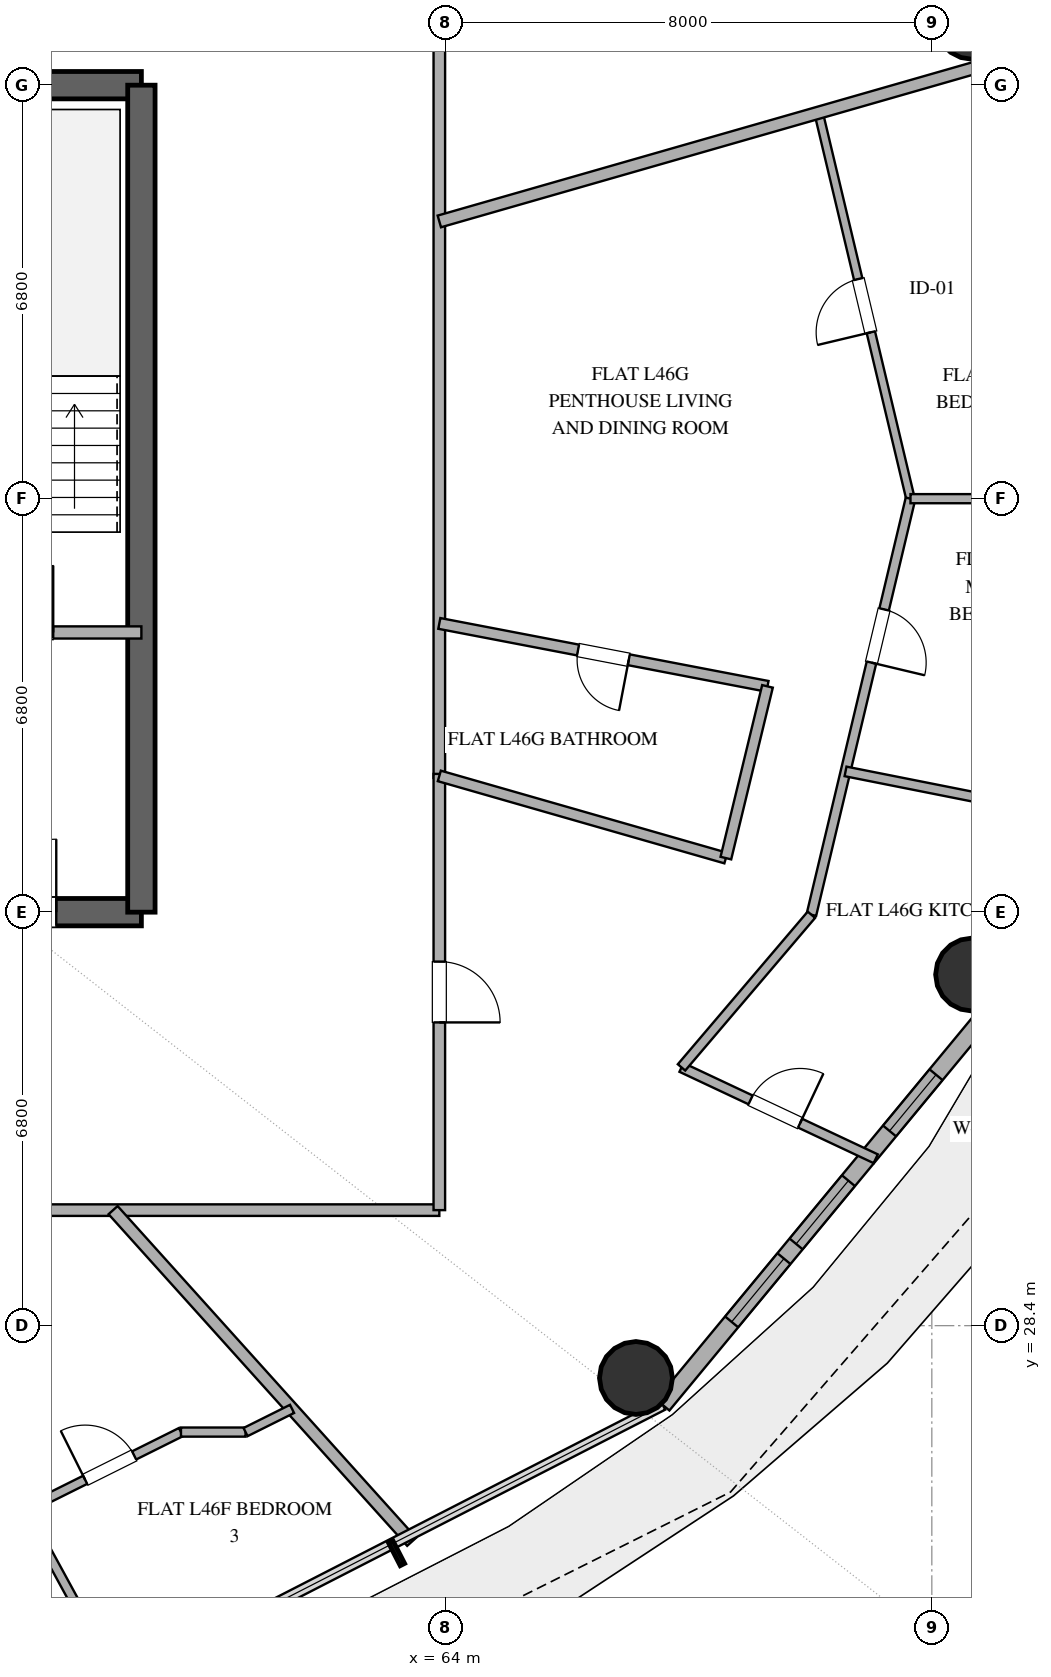
"""IFC4 building model, lengths in metres.
Left out: names, types, materials, properties, quantities, classifications, styles, units other than length and angle.
Written with IfcOpenShell. Run it as: python <this file> out.ifc"""

import sys

from ifc_helpers import new_model, si_unit, direction, frame, frame_2d, origin, origin_2d, place, context, subcontext, project, spatial, rectangle, hollow_circle, extrude, element, fill, save


model = new_model("IFC4")
c1 = context("Model", 3, precision=1e-05, world=origin(), true_north=direction((0.0, 1.0)))
c2 = subcontext(c1, "Body", "Model", "MODEL_VIEW")
j1 = project(units=[si_unit("LENGTHUNIT", "METRE"), si_unit("PLANEANGLEUNIT", "RADIAN")], contexts=[c1])
p1 = place(None, origin())
s1 = spatial("IfcSite", under=j1, at=p1, CompositionType="ELEMENT")
p2 = place(p1, origin())
s2 = spatial("IfcBuilding", under=s1, at=p2, CompositionType="ELEMENT")
p3 = place(p2, frame((0.0, 0.0, 183.0)))
s3 = spatial("IfcBuildingStorey", under=s2, at=p3, CompositionType="ELEMENT", Elevation=183.0)
p4 = place(p3, frame((55.0, 35.2, 0.0), z_axis=(0.0, 0.0, 1.0), x_axis=(1.0, 0.0, 0.0)))
e1 = element("IfcWall", 1, at=p4, inside=s3, PredefinedType="SHEAR", context=c2, shape_type="SweptSolid", body=[
    extrude(rectangle(XDim=4.0, YDim=0.45, at=frame_2d((2.0, 0.0))), origin(), (0.0, 0.0, 1.0), 3.38),
])
p5 = place(p4, frame((1.4, 0.0, 0.0)))
e2 = element("IfcOpeningElement", 2, at=p5, cuts=e1, PredefinedType="OPENING", context=c2, shape_type="SweptSolid", body=[
    extrude(rectangle(XDim=1.2, YDim=2.15, at=frame_2d((0.6, 1.075))), frame((0.0, 0.235, 0.0), z_axis=(0.0, -1.0, 0.0), x_axis=(1.0, 0.0, 0.0)), (0.0, 0.0, 1.0), 0.47),
])
p6 = place(p3, frame((55.0, 48.8, 0.0), z_axis=(0.0, 0.0, 1.0), x_axis=(1.0, 0.0, 0.0)))
e3 = element("IfcWall", 3, at=p6, inside=s3, PredefinedType="SHEAR", context=c2, shape_type="SweptSolid", body=[
    extrude(rectangle(XDim=4.0, YDim=0.45, at=frame_2d((2.0, 0.0))), origin(), (0.0, 0.0, 1.0), 3.38),
])
p7 = place(p3, frame((59.0, 35.2, 0.0), z_axis=(0.0, 0.0, 1.0), x_axis=(0.0, 1.0, 0.0)))
e4 = element("IfcWall", 4, at=p7, inside=s3, PredefinedType="SHEAR", context=c2, shape_type="SweptSolid", body=[
    extrude(rectangle(XDim=13.6, YDim=0.45, at=frame_2d((6.8, 0.0))), origin(), (0.0, 0.0, 1.0), 3.38),
])
for number, where, z_axis, x_axis in (
    (5, (72.662, 49.826, 0.0), (0.0, 0.0, 1.0), (1.0, 0.0, 0.0)),
    (6, (67.134, 27.54, 0.0), (0.0, 0.0, 1.0), (1.0, 0.0, 0.0)),
    (7, (72.662, 34.174, 0.0), (0.0, 0.0, 1.0), (1.0, 0.0, 0.0)),
):
    element("IfcColumn", number, at=place(p3, frame(where, z_axis=z_axis, x_axis=x_axis)), inside=s3, PredefinedType="COLUMN", context=c2, shape_type="SweptSolid", body=[
        extrude(hollow_circle(Radius=0.6, WallThickness=0.032, at=origin_2d()), origin(), (0.0, 0.0, 1.0), 3.38),
    ])
p8 = place(p3, frame((67.576, 27.094, 0.0), z_axis=(0.0, 0.0, 1.0), x_axis=(0.637333477683, 0.770588111915, 0.0)))
e8 = element("IfcWall", 8, at=p8, inside=s3, PredefinedType="SOLIDWALL", context=c2, shape_type="SweptSolid", body=[
    extrude(rectangle(XDim=8.875, YDim=0.28, at=frame_2d((4.438, 0.0))), origin(), (0.0, 0.0, 1.0), 3.38),
])
p9 = place(p8, frame((1.775, 0.0, 0.85)))
e9 = element("IfcOpeningElement", 9, at=p9, cuts=e8, PredefinedType="OPENING", context=c2, shape_type="SweptSolid", body=[
    extrude(rectangle(XDim=1.35, YDim=1.8, at=frame_2d((0.675, 0.9))), frame((0.0, 0.15, 0.0), z_axis=(0.0, -1.0, 0.0), x_axis=(1.0, 0.0, 0.0)), (0.0, 0.0, 1.0), 0.3),
])
p10 = place(p8, frame((3.439, 0.0, 0.85)))
e10 = element("IfcOpeningElement", 10, at=p10, cuts=e8, PredefinedType="OPENING", context=c2, shape_type="SweptSolid", body=[
    extrude(rectangle(XDim=1.35, YDim=1.8, at=frame_2d((0.675, 0.9))), frame((0.0, 0.15, 0.0), z_axis=(0.0, -1.0, 0.0), x_axis=(1.0, 0.0, 0.0)), (0.0, 0.0, 1.0), 0.3),
])
p11 = place(p8, frame((5.85, 0.0, 0.85)))
e11 = element("IfcOpeningElement", 11, at=p11, cuts=e8, PredefinedType="OPENING", context=c2, shape_type="SweptSolid", body=[
    extrude(rectangle(XDim=1.2, YDim=1.8, at=frame_2d((0.6, 0.9))), frame((0.0, 0.15, 0.0), z_axis=(0.0, -1.0, 0.0), x_axis=(1.0, 0.0, 0.0)), (0.0, 0.0, 1.0), 0.3),
])
p12 = place(p3, frame((55.0, 39.8, 0.0), z_axis=(0.0, 0.0, 1.0), x_axis=(1.0, 0.0, 0.0)))
e12 = element("IfcWall", 12, at=p12, inside=s3, PredefinedType="SOLIDWALL", context=c2, shape_type="SweptSolid", body=[
    extrude(rectangle(XDim=4.0, YDim=0.2, at=frame_2d((2.0, 0.0))), origin(), (0.0, 0.0, 1.0), 2.74),
])
p13 = place(p12, frame((1.45, 0.0, 0.0)))
e13 = element("IfcOpeningElement", 13, at=p13, cuts=e12, PredefinedType="OPENING", context=c2, shape_type="SweptSolid", body=[
    extrude(rectangle(XDim=1.1, YDim=2.15, at=frame_2d((0.55, 1.075))), frame((0.0, 0.11, 0.0), z_axis=(0.0, -1.0, 0.0), x_axis=(1.0, 0.0, 0.0)), (0.0, 0.0, 1.0), 0.22),
])
p14 = place(p3, frame((46.818, 30.3, 0.0), z_axis=(0.0, 0.0, 1.0), x_axis=(1.0, 0.0, 0.0)))
e14 = element("IfcWall", 14, at=p14, inside=s3, PredefinedType="PARTITIONING", context=c2, shape_type="SweptSolid", body=[
    extrude(rectangle(XDim=17.082, YDim=0.19, at=frame_2d((8.541, 0.0))), origin(), (0.0, 0.0, 1.0), 2.74),
])
p15 = place(p14, frame((5.358, 0.0, 0.0)))
e15 = element("IfcOpeningElement", 15, at=p15, cuts=e14, PredefinedType="OPENING", context=c2, shape_type="SweptSolid", body=[
    extrude(rectangle(XDim=1.0, YDim=2.2, at=frame_2d((0.5, 1.1))), frame((0.0, 0.105, 0.0), z_axis=(0.0, -1.0, 0.0), x_axis=(1.0, 0.0, 0.0)), (0.0, 0.0, 1.0), 0.21),
])
p16 = place(p3, frame((63.9, 53.7, 0.0), z_axis=(0.0, 0.0, 1.0), x_axis=(0.0, -1.0, 0.0)))
e16 = element("IfcWall", 16, at=p16, inside=s3, PredefinedType="PARTITIONING", context=c2, shape_type="SweptSolid", body=[
    extrude(rectangle(XDim=16.292, YDim=0.19, at=frame_2d((8.146, 0.0))), origin(), (0.0, 0.0, 1.0), 2.74),
])
p17 = place(p16, frame((3.087, 0.0, 0.0)))
e17 = element("IfcOpeningElement", 17, at=p17, cuts=e16, PredefinedType="OPENING", context=c2, shape_type="SweptSolid", body=[
    extrude(rectangle(XDim=1.0, YDim=2.2, at=frame_2d((0.5, 1.1))), frame((0.0, 0.105, 0.0), z_axis=(0.0, -1.0, 0.0), x_axis=(1.0, 0.0, 0.0)), (0.0, 0.0, 1.0), 0.21),
])
p18 = place(p3, frame((63.9, 37.474, 0.0), z_axis=(0.0, 0.0, 1.0), x_axis=(0.0, -1.0, 0.0)))
e18 = element("IfcWall", 18, at=p18, inside=s3, PredefinedType="PARTITIONING", context=c2, shape_type="SweptSolid", body=[
    extrude(rectangle(XDim=7.174, YDim=0.19, at=frame_2d((3.587, 0.0))), origin(), (0.0, 0.0, 1.0), 2.74),
])
p19 = place(p18, frame((3.087, 0.0, 0.0)))
e19 = element("IfcOpeningElement", 19, at=p19, cuts=e18, PredefinedType="OPENING", context=c2, shape_type="SweptSolid", body=[
    extrude(rectangle(XDim=1.0, YDim=2.2, at=frame_2d((0.5, 1.1))), frame((0.0, 0.105, 0.0), z_axis=(0.0, -1.0, 0.0), x_axis=(1.0, 0.0, 0.0)), (0.0, 0.0, 1.0), 0.21),
])
p20 = place(p3, frame((71.649, 42.0, 0.0), z_axis=(0.0, 0.0, 1.0), x_axis=(-0.231639074409, 0.972801798522, 0.0)))
e20 = element("IfcWall", 20, at=p20, inside=s3, PredefinedType="PARTITIONING", context=c2, shape_type="SweptSolid", body=[
    extrude(rectangle(XDim=6.525, YDim=0.14, at=frame_2d((3.263, 0.0))), origin(), (0.0, 0.0, 1.0), 2.74),
])
p21 = place(p20, frame((2.812, 0.0, 0.0)))
e21 = element("IfcOpeningElement", 21, at=p21, cuts=e20, PredefinedType="OPENING", context=c2, shape_type="SweptSolid", body=[
    extrude(rectangle(XDim=0.9, YDim=2.1, at=frame_2d((0.45, 1.05))), frame((0.0, 0.08, 0.0), z_axis=(0.0, -1.0, 0.0), x_axis=(1.0, 0.0, 0.0)), (0.0, 0.0, 1.0), 0.16),
])
p22 = place(p3, frame((73.528, 49.32, 0.0), z_axis=(0.0, 0.0, 1.0), x_axis=(-0.961265987417, -0.275622389211, 0.0)))
e22 = element("IfcWall", 22, at=p22, inside=s3, PredefinedType="PARTITIONING", context=c2, shape_type="SweptSolid", body=[
    extrude(rectangle(XDim=10.016, YDim=0.2, at=frame_2d((5.008, 0.0))), origin(), (0.0, 0.0, 1.0), 2.74),
])
p23 = place(p3, frame((69.297, 38.914, 0.0), z_axis=(0.0, 0.0, 1.0), x_axis=(-0.982108019882, 0.188318446478, 0.0)))
e23 = element("IfcWall", 23, at=p23, inside=s3, PredefinedType="PLUMBINGWALL", context=c2, shape_type="SweptSolid", body=[
    extrude(rectangle(XDim=5.496, YDim=0.18, at=frame_2d((2.748, 0.0))), origin(), (0.0, 0.0, 1.0), 2.74),
])
p24 = place(p23, frame((2.323, 0.0, 0.0)))
e24 = element("IfcOpeningElement", 24, at=p24, cuts=e23, PredefinedType="OPENING", context=c2, shape_type="SweptSolid", body=[
    extrude(rectangle(XDim=0.85, YDim=2.1, at=frame_2d((0.425, 1.05))), frame((0.0, 0.1, 0.0), z_axis=(0.0, -1.0, 0.0), x_axis=(1.0, 0.0, 0.0)), (0.0, 0.0, 1.0), 0.2),
])
p25 = place(p3, frame((63.9, 37.441, 0.0), z_axis=(0.0, 0.0, 1.0), x_axis=(0.961266088446, -0.27562203686, 0.0)))
e25 = element("IfcWall", 25, at=p25, inside=s3, PredefinedType="PLUMBINGWALL", context=c2, shape_type="SweptSolid", body=[
    extrude(rectangle(XDim=4.903, YDim=0.18, at=frame_2d((2.451, 0.0))), origin(), (0.0, 0.0, 1.0), 2.74),
])
p26 = place(p3, frame((71.649, 42.0, 0.0), z_axis=(0.0, 0.0, 1.0), x_axis=(-0.231625219966, -0.972805097373, 0.0)))
e26 = element("IfcWall", 26, at=p26, inside=s3, PredefinedType="PLUMBINGWALL", context=c2, shape_type="SweptSolid", body=[
    extrude(rectangle(XDim=7.033, YDim=0.16, at=frame_2d((3.517, 0.0))), origin(), (0.0, 0.0, 1.0), 2.74),
])
p27 = place(p26, frame((1.871, 0.0, 0.0)))
e27 = element("IfcOpeningElement", 27, at=p27, cuts=e26, PredefinedType="OPENING", context=c2, shape_type="SweptSolid", body=[
    extrude(rectangle(XDim=0.9, YDim=2.1, at=frame_2d((0.45, 1.05))), frame((0.0, 0.09, 0.0), z_axis=(0.0, -1.0, 0.0), x_axis=(1.0, 0.0, 0.0)), (0.0, 0.0, 1.0), 0.18),
])
p28 = place(p3, frame((63.445, 24.846, 0.0), z_axis=(0.0, 0.0, 1.0), x_axis=(-0.669111750453, 0.743161802979, 0.0)))
e28 = element("IfcWall", 28, at=p28, inside=s3, PredefinedType="PARTITIONING", context=c2, shape_type="SweptSolid", body=[
    extrude(rectangle(XDim=7.339, YDim=0.2, at=frame_2d((3.669, 0.0))), origin(), (0.0, 0.0, 1.0), 2.74),
])
p29 = place(p3, frame((75.219, 42.0, 0.0), z_axis=(0.0, 0.0, 1.0), x_axis=(-1.0, 0.0, 0.0)))
e29 = element("IfcWall", 29, at=p29, inside=s3, PredefinedType="PARTITIONING", context=c2, shape_type="SweptSolid", body=[
    extrude(rectangle(XDim=3.571, YDim=0.15, at=frame_2d((1.785, 0.0))), origin(), (0.0, 0.0, 1.0), 2.74),
])
p30 = place(p3, frame((67.883, 32.647, 0.0), z_axis=(0.0, 0.0, 1.0), x_axis=(0.904904903403, -0.425613810628, 0.0)))
e30 = element("IfcWall", 30, at=p30, inside=s3, PredefinedType="PLUMBINGWALL", context=c2, shape_type="SweptSolid", body=[
    extrude(rectangle(XDim=3.53, YDim=0.16, at=frame_2d((1.765, 0.0))), origin(), (0.0, 0.0, 1.0), 2.74),
])
p31 = place(p30, frame((1.255, 0.0, 0.0)))
e31 = element("IfcOpeningElement", 31, at=p31, cuts=e30, PredefinedType="OPENING", context=c2, shape_type="SweptSolid", body=[
    extrude(rectangle(XDim=0.9, YDim=2.1, at=frame_2d((0.45, 1.05))), frame((0.0, 0.09, 0.0), z_axis=(0.0, -1.0, 0.0), x_axis=(1.0, 0.0, 0.0)), (0.0, 0.0, 1.0), 0.18),
])
p32 = place(p3, frame((74.026, 36.831, 0.0), z_axis=(0.0, 0.0, 1.0), x_axis=(-0.980839121604, 0.194819448544, 0.0)))
e32 = element("IfcWall", 32, at=p32, inside=s3, PredefinedType="PLUMBINGWALL", context=c2, shape_type="SweptSolid", body=[
    extrude(rectangle(XDim=3.513, YDim=0.16, at=frame_2d((1.756, 0.0))), origin(), (0.0, 0.0, 1.0), 2.74),
])
p33 = place(p3, frame((57.037, 25.442, 0.0), z_axis=(0.0, 0.0, 1.0), x_axis=(0.479035633035, -0.877795455834, 0.0)))
e33 = element("IfcWall", 33, at=p33, inside=s3, PredefinedType="PARTITIONING", context=c2, shape_type="SweptSolid", body=[
    extrude(rectangle(XDim=3.449, YDim=0.15, at=frame_2d((1.724, 0.0))), origin(), (0.0, 0.0, 1.0), 2.74),
])
p34 = place(p3, frame((70.02, 35.158, 0.0), z_axis=(0.0, 0.0, 1.0), x_axis=(-0.648054655451, -0.761593831086, 0.0)))
e34 = element("IfcWall", 34, at=p34, inside=s3, PredefinedType="PLUMBINGWALL", context=c2, shape_type="SweptSolid", body=[
    extrude(rectangle(XDim=3.296, YDim=0.16, at=frame_2d((1.648, 0.0))), origin(), (0.0, 0.0, 1.0), 2.74),
])
p35 = place(p3, frame((68.613, 36.089, 0.0), z_axis=(0.0, 0.0, 1.0), x_axis=(0.235491818528, 0.971876331334, 0.0)))
e35 = element("IfcWall", 35, at=p35, inside=s3, PredefinedType="PLUMBINGWALL", context=c2, shape_type="SweptSolid", body=[
    extrude(rectangle(XDim=2.906, YDim=0.18, at=frame_2d((1.453, 0.0))), origin(), (0.0, 0.0, 1.0), 2.74),
])
p36 = place(p3, frame((57.305, 25.481, 0.0), z_axis=(0.0, 0.0, 1.0), x_axis=(0.895041110332, 0.445983644112, 0.0)))
e36 = element("IfcWall", 36, at=p36, inside=s3, PredefinedType="PARTITIONING", context=c2, shape_type="SweptSolid", body=[
    extrude(rectangle(XDim=2.621, YDim=0.15, at=frame_2d((1.311, 0.0))), origin(), (0.0, 0.0, 1.0), 2.74),
])
p37 = place(p36, frame((0.861, 0.0, 0.0)))
e37 = element("IfcOpeningElement", 37, at=p37, cuts=e36, PredefinedType="OPENING", context=c2, shape_type="SweptSolid", body=[
    extrude(rectangle(XDim=0.9, YDim=2.1, at=frame_2d((0.45, 1.05))), frame((0.0, 0.085, 0.0), z_axis=(0.0, -1.0, 0.0), x_axis=(1.0, 0.0, 0.0)), (0.0, 0.0, 1.0), 0.17),
])
p38 = place(p3, frame((59.651, 26.65, 0.0), z_axis=(0.0, 0.0, 1.0), x_axis=(1.0, 0.0, 0.0)))
e38 = element("IfcWall", 38, at=p38, inside=s3, PredefinedType="PARTITIONING", context=c2, shape_type="SweptSolid", body=[
    extrude(rectangle(XDim=1.062, YDim=0.15, at=frame_2d((0.531, 0.0))), origin(), (0.0, 0.0, 1.0), 2.74),
])
p39 = place(p3, frame((60.713, 26.65, 0.0), z_axis=(0.0, 0.0, 1.0), x_axis=(0.894826947278, 0.446413188006, 0.0)))
e39 = element("IfcWall", 39, at=p39, inside=s3, PredefinedType="PARTITIONING", context=c2, shape_type="SweptSolid", body=[
    extrude(rectangle(XDim=0.854, YDim=0.15, at=frame_2d((0.427, 0.0))), origin(), (0.0, 0.0, 1.0), 2.74),
])
p40 = place(p9, origin())
e40 = element("IfcWindow", 40, at=p40, inside=s3, PartitioningType="SINGLE_PANEL", PredefinedType="WINDOW", context=c2, shape_type="SweptSolid", body=[
    extrude(rectangle(XDim=1.35, YDim=1.8, at=frame_2d((0.675, 0.9))), frame((0.0, 0.03, 0.0), z_axis=(0.0, -1.0, 0.0), x_axis=(1.0, 0.0, 0.0)), (0.0, 0.0, 1.0), 0.06),
])
fill(e9, e40)
p41 = place(p10, origin())
e41 = element("IfcWindow", 41, at=p41, inside=s3, PartitioningType="SINGLE_PANEL", PredefinedType="WINDOW", context=c2, shape_type="SweptSolid", body=[
    extrude(rectangle(XDim=1.35, YDim=1.8, at=frame_2d((0.675, 0.9))), frame((0.0, 0.03, 0.0), z_axis=(0.0, -1.0, 0.0), x_axis=(1.0, 0.0, 0.0)), (0.0, 0.0, 1.0), 0.06),
])
fill(e10, e41)
p42 = place(p11, origin())
e42 = element("IfcWindow", 42, at=p42, inside=s3, PartitioningType="SINGLE_PANEL", PredefinedType="WINDOW", context=c2, shape_type="SweptSolid", body=[
    extrude(rectangle(XDim=1.2, YDim=1.8, at=frame_2d((0.6, 0.9))), frame((0.0, 0.03, 0.0), z_axis=(0.0, -1.0, 0.0), x_axis=(1.0, 0.0, 0.0)), (0.0, 0.0, 1.0), 0.06),
])
fill(e11, e42)
p43 = place(p5, origin())
e43 = element("IfcDoor", 43, at=p43, inside=s3, OperationType="SINGLE_SWING_RIGHT", PredefinedType="DOOR", context=c2, shape_type="SweptSolid", body=[
    extrude(rectangle(XDim=1.2, YDim=2.15, at=frame_2d((0.6, 1.075))), frame((0.0, 0.025, 0.0), z_axis=(0.0, -1.0, 0.0), x_axis=(1.0, 0.0, 0.0)), (0.0, 0.0, 1.0), 0.05),
])
fill(e2, e43)
p44 = place(p13, origin())
e44 = element("IfcDoor", 44, at=p44, inside=s3, OperationType="SINGLE_SWING_RIGHT", PredefinedType="DOOR", context=c2, shape_type="SweptSolid", body=[
    extrude(rectangle(XDim=1.1, YDim=2.15, at=frame_2d((0.55, 1.075))), frame((0.0, 0.025, 0.0), z_axis=(0.0, -1.0, 0.0), x_axis=(1.0, 0.0, 0.0)), (0.0, 0.0, 1.0), 0.05),
])
fill(e13, e44)
p45 = place(p19, origin())
e45 = element("IfcDoor", 45, at=p45, inside=s3, OperationType="SINGLE_SWING_RIGHT", PredefinedType="DOOR", context=c2, shape_type="SweptSolid", body=[
    extrude(rectangle(XDim=1.0, YDim=2.2, at=frame_2d((0.5, 1.1))), frame((0.0, 0.025, 0.0), z_axis=(0.0, -1.0, 0.0), x_axis=(1.0, 0.0, 0.0)), (0.0, 0.0, 1.0), 0.05),
])
fill(e19, e45)
p46 = place(p21, origin())
e46 = element("IfcDoor", 46, at=p46, inside=s3, OperationType="SINGLE_SWING_LEFT", PredefinedType="DOOR", context=c2, shape_type="SweptSolid", body=[
    extrude(rectangle(XDim=0.9, YDim=2.1, at=frame_2d((0.45, 1.05))), frame((0.0, 0.025, 0.0), z_axis=(0.0, -1.0, 0.0), x_axis=(1.0, 0.0, 0.0)), (0.0, 0.0, 1.0), 0.05),
])
fill(e21, e46)
p47 = place(p24, origin())
e47 = element("IfcDoor", 47, at=p47, inside=s3, OperationType="SINGLE_SWING_LEFT", PredefinedType="DOOR", context=c2, shape_type="SweptSolid", body=[
    extrude(rectangle(XDim=0.85, YDim=2.1, at=frame_2d((0.425, 1.05))), frame((0.0, 0.025, 0.0), z_axis=(0.0, -1.0, 0.0), x_axis=(1.0, 0.0, 0.0)), (0.0, 0.0, 1.0), 0.05),
])
fill(e24, e47)
p48 = place(p27, origin())
e48 = element("IfcDoor", 48, at=p48, inside=s3, OperationType="SINGLE_SWING_RIGHT", PredefinedType="DOOR", context=c2, shape_type="SweptSolid", body=[
    extrude(rectangle(XDim=0.9, YDim=2.1, at=frame_2d((0.45, 1.05))), frame((0.0, 0.025, 0.0), z_axis=(0.0, -1.0, 0.0), x_axis=(1.0, 0.0, 0.0)), (0.0, 0.0, 1.0), 0.05),
])
fill(e27, e48)
p49 = place(p31, origin())
e49 = element("IfcDoor", 49, at=p49, inside=s3, OperationType="SINGLE_SWING_RIGHT", PredefinedType="DOOR", context=c2, shape_type="SweptSolid", body=[
    extrude(rectangle(XDim=0.9, YDim=2.1, at=frame_2d((0.45, 1.05))), frame((0.0, 0.025, 0.0), z_axis=(0.0, -1.0, 0.0), x_axis=(1.0, 0.0, 0.0)), (0.0, 0.0, 1.0), 0.05),
])
fill(e31, e49)
p50 = place(p37, origin())
e50 = element("IfcDoor", 50, at=p50, inside=s3, OperationType="SINGLE_SWING_LEFT", PredefinedType="DOOR", context=c2, shape_type="SweptSolid", body=[
    extrude(rectangle(XDim=0.9, YDim=2.1, at=frame_2d((0.45, 1.05))), frame((0.0, 0.025, 0.0), z_axis=(0.0, -1.0, 0.0), x_axis=(1.0, 0.0, 0.0)), (0.0, 0.0, 1.0), 0.05),
])
fill(e37, e50)
save(model, sys.argv[1])
